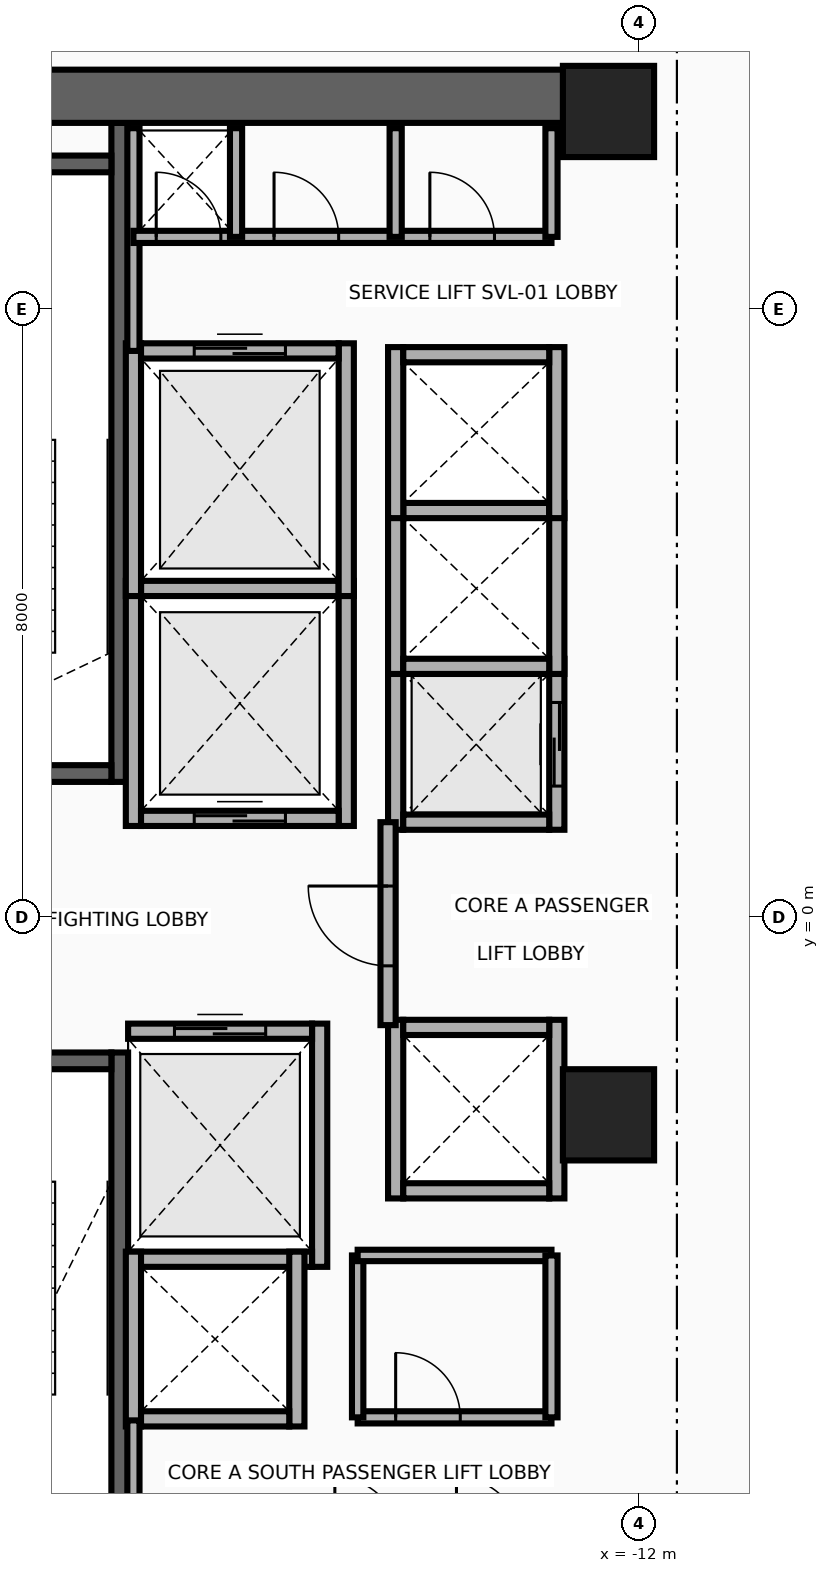
"""IFC4 building model, lengths in metres.
Left out: names, types, materials, properties, quantities, classifications, styles, units other than length and angle.
Written with IfcOpenShell. Run it as: python <this file> out.ifc"""

import sys

from ifc_helpers import new_model, si_unit, direction, frame, frame_2d, origin, origin_2d, place, context, subcontext, project, spatial, rectangle, extrude, source, transform, mapped, element, fill, save


model = new_model("IFC4")
c1 = context("Model", 3, precision=1e-05, world=origin(), true_north=direction((0.0, 1.0)))
c2 = subcontext(c1, "Body", "Model", "MODEL_VIEW")
j1 = project(units=[si_unit("LENGTHUNIT", "METRE"), si_unit("PLANEANGLEUNIT", "RADIAN")], contexts=[c1])
p1 = place(None, origin())
s1 = spatial("IfcSite", under=j1, at=p1, CompositionType="ELEMENT")
p2 = place(p1, origin())
s2 = spatial("IfcBuilding", under=s1, at=p2, CompositionType="ELEMENT")
p3 = place(p2, frame((0.0, 0.0, 116.8)))
s3 = spatial("IfcBuildingStorey", under=s2, at=p3, CompositionType="ELEMENT", Elevation=116.8)
p4 = place(p3, frame((-18.83, 1.78, 0.0), z_axis=(0.0, 0.0, 1.0), x_axis=(0.0, 1.0, 0.0)))
e1 = element("IfcWall", 1, at=p4, inside=s3, PredefinedType="SHEAR", context=c2, shape_type="SweptSolid", body=[
    extrude(rectangle(XDim=8.67, YDim=0.22, at=frame_2d((4.335, 0.0))), origin(), (0.0, 0.0, 1.0), 3.46),
])
p5 = place(p3, frame((-22.05, 1.89, 0.0), z_axis=(0.0, 0.0, 1.0), x_axis=(1.0, 0.0, 0.0)))
e2 = element("IfcWall", 2, at=p5, inside=s3, PredefinedType="SHEAR", context=c2, shape_type="SweptSolid", body=[
    extrude(rectangle(XDim=3.11, YDim=0.22, at=frame_2d((1.555, 0.0))), origin(), (0.0, 0.0, 1.0), 3.46),
])
p6 = place(p5, frame((1.0, 0.0, 0.0)))
e3 = element("IfcOpeningElement", 3, at=p6, cuts=e2, PredefinedType="OPENING", context=c2, shape_type="SweptSolid", body=[
    extrude(rectangle(XDim=1.1, YDim=2.15, at=frame_2d((0.55, 1.075))), frame((0.0, 0.125, 0.0), z_axis=(0.0, -1.0, 0.0), x_axis=(1.0, 0.0, 0.0)), (0.0, 0.0, 1.0), 0.25),
])
p7 = place(p3, frame((-22.05, 9.91, 0.0), z_axis=(0.0, 0.0, 1.0), x_axis=(1.0, 0.0, 0.0)))
e4 = element("IfcWall", 4, at=p7, inside=s3, PredefinedType="SHEAR", context=c2, shape_type="SweptSolid", body=[
    extrude(rectangle(XDim=3.11, YDim=0.22, at=frame_2d((1.555, 0.0))), origin(), (0.0, 0.0, 1.0), 3.46),
])
p8 = place(p3, frame((-18.83, -10.45, 0.0), z_axis=(0.0, 0.0, 1.0), x_axis=(0.0, 1.0, 0.0)))
e5 = element("IfcWall", 5, at=p8, inside=s3, PredefinedType="SHEAR", context=c2, shape_type="SweptSolid", body=[
    extrude(rectangle(XDim=8.67, YDim=0.22, at=frame_2d((4.335, 0.0))), origin(), (0.0, 0.0, 1.0), 3.46),
])
p9 = place(p3, frame((-22.05, -1.89, 0.0), z_axis=(0.0, 0.0, 1.0), x_axis=(1.0, 0.0, 0.0)))
e6 = element("IfcWall", 6, at=p9, inside=s3, PredefinedType="SHEAR", context=c2, shape_type="SweptSolid", body=[
    extrude(rectangle(XDim=3.11, YDim=0.22, at=frame_2d((1.555, 0.0))), origin(), (0.0, 0.0, 1.0), 3.46),
])
p10 = place(p9, frame((1.0, 0.0, 0.0)))
e7 = element("IfcOpeningElement", 7, at=p10, cuts=e6, PredefinedType="OPENING", context=c2, shape_type="SweptSolid", body=[
    extrude(rectangle(XDim=1.1, YDim=2.15, at=frame_2d((0.55, 1.075))), frame((0.0, 0.125, 0.0), z_axis=(0.0, -1.0, 0.0), x_axis=(1.0, 0.0, 0.0)), (0.0, 0.0, 1.0), 0.25),
])
p11 = place(p3, frame((-22.65, 10.8, 0.0), z_axis=(0.0, 0.0, 1.0), x_axis=(1.0, 0.0, 0.0)))
e8 = element("IfcWall", 8, at=p11, inside=s3, PredefinedType="SHEAR", context=c2, shape_type="SweptSolid", body=[
    extrude(rectangle(XDim=10.25, YDim=0.7, at=frame_2d((5.125, 0.0))), origin(), (0.0, 0.0, 1.0), 3.46),
])
m1 = source(origin(), c2, "Body", "SweptSolid", [
    extrude(rectangle(XDim=1.2, YDim=1.2, at=origin_2d()), origin(), (0.0, 0.0, 1.0), 3.7),
])
for number, where, z_axis, x_axis in (
    (9, (-12.4, -2.6, 0.0), (0.0, 0.0, 1.0), (1.0, 0.0, 0.0)),
    (10, (-12.4, 10.6, 0.0), (0.0, 0.0, 1.0), (1.0, 0.0, 0.0)),
):
    element("IfcColumn", number, at=place(p3, frame(where, z_axis=z_axis, x_axis=x_axis)), inside=s3, PredefinedType="COLUMN", context=c2, shape_type="MappedRepresentation", body=[
        mapped(m1, transform((0.0, 0.0, 0.0), x_axis=(1.0, 0.0, 0.0), y_axis=(0.0, 1.0, 0.0), z_axis=(0.0, 0.0, 1.0), scale=1.0)),
    ])
for number, where, z_axis, x_axis in (
    (11, (-18.65, 1.2, 0.0), (0.0, 0.0, 1.0), (0.0, 1.0, 0.0)),
    (12, (-15.85, 1.2, 0.0), (0.0, 0.0, 1.0), (0.0, 1.0, 0.0)),
):
    element("IfcWall", number, at=place(p3, frame(where, z_axis=z_axis, x_axis=x_axis)), inside=s3, PredefinedType="MOVABLE", context=c2, shape_type="SweptSolid", body=[
        extrude(rectangle(XDim=3.225, YDim=0.2, at=frame_2d((1.613, 0.0))), origin(), (0.0, 0.0, 1.0), 3.46),
    ])
p12 = place(p3, frame((-18.55, 1.3, 0.0), z_axis=(0.0, 0.0, 1.0), x_axis=(1.0, 0.0, 0.0)))
e13 = element("IfcWall", 13, at=p12, inside=s3, PredefinedType="MOVABLE", context=c2, shape_type="SweptSolid", body=[
    extrude(rectangle(XDim=2.6, YDim=0.2, at=frame_2d((1.3, 0.0))), origin(), (0.0, 0.0, 1.0), 3.46),
])
p13 = place(p12, frame((0.7, 0.0, 0.0)))
e14 = element("IfcOpeningElement", 14, at=p13, cuts=e13, PredefinedType="OPENING", context=c2, shape_type="SweptSolid", body=[
    extrude(rectangle(XDim=1.2, YDim=2.1, at=frame_2d((0.6, 1.05))), frame((0.0, 0.115, 0.0), z_axis=(0.0, -1.0, 0.0), x_axis=(1.0, 0.0, 0.0)), (0.0, 0.0, 1.0), 0.23),
])
p14 = place(p3, frame((-18.55, 4.325, 0.0), z_axis=(0.0, 0.0, 1.0), x_axis=(1.0, 0.0, 0.0)))
e15 = element("IfcWall", 15, at=p14, inside=s3, PredefinedType="MOVABLE", context=c2, shape_type="SweptSolid", body=[
    extrude(rectangle(XDim=2.6, YDim=0.2, at=frame_2d((1.3, 0.0))), origin(), (0.0, 0.0, 1.0), 3.46),
])
p15 = place(p3, frame((-16.2, -4.6, 0.0), z_axis=(0.0, 0.0, 1.0), x_axis=(0.0, 1.0, 0.0)))
e16 = element("IfcWall", 16, at=p15, inside=s3, PredefinedType="MOVABLE", context=c2, shape_type="SweptSolid", body=[
    extrude(rectangle(XDim=3.2, YDim=0.2, at=frame_2d((1.6, 0.0))), origin(), (0.0, 0.0, 1.0), 3.46),
])
p16 = place(p3, frame((-18.72, -4.5, 0.0), z_axis=(0.0, 0.0, 1.0), x_axis=(1.0, 0.0, 0.0)))
e17 = element("IfcWall", 17, at=p16, inside=s3, PredefinedType="MOVABLE", context=c2, shape_type="SweptSolid", body=[
    extrude(rectangle(XDim=2.42, YDim=0.2, at=frame_2d((1.21, 0.0))), origin(), (0.0, 0.0, 1.0), 3.46),
])
p17 = place(p3, frame((-18.72, -1.5, 0.0), z_axis=(0.0, 0.0, 1.0), x_axis=(1.0, 0.0, 0.0)))
e18 = element("IfcWall", 18, at=p17, inside=s3, PredefinedType="MOVABLE", context=c2, shape_type="SweptSolid", body=[
    extrude(rectangle(XDim=2.42, YDim=0.2, at=frame_2d((1.21, 0.0))), origin(), (0.0, 0.0, 1.0), 3.46),
])
p18 = place(p17, frame((0.61, 0.0, 0.0)))
e19 = element("IfcOpeningElement", 19, at=p18, cuts=e18, PredefinedType="OPENING", context=c2, shape_type="SweptSolid", body=[
    extrude(rectangle(XDim=1.2, YDim=2.1, at=frame_2d((0.6, 1.05))), frame((0.0, 0.115, 0.0), z_axis=(0.0, -1.0, 0.0), x_axis=(1.0, 0.0, 0.0)), (0.0, 0.0, 1.0), 0.23),
])
for number, where, z_axis, x_axis in (
    (20, (-18.65, 4.225, 0.0), (0.0, 0.0, 1.0), (0.0, 1.0, 0.0)),
    (21, (-15.85, 4.225, 0.0), (0.0, 0.0, 1.0), (0.0, 1.0, 0.0)),
):
    element("IfcWall", number, at=place(p3, frame(where, z_axis=z_axis, x_axis=x_axis)), inside=s3, PredefinedType="MOVABLE", context=c2, shape_type="SweptSolid", body=[
        extrude(rectangle(XDim=3.325, YDim=0.2, at=frame_2d((1.663, 0.0))), origin(), (0.0, 0.0, 1.0), 3.46),
    ])
p19 = place(p3, frame((-18.55, 7.45, 0.0), z_axis=(0.0, 0.0, 1.0), x_axis=(1.0, 0.0, 0.0)))
e22 = element("IfcWall", 22, at=p19, inside=s3, PredefinedType="MOVABLE", context=c2, shape_type="SweptSolid", body=[
    extrude(rectangle(XDim=2.6, YDim=0.2, at=frame_2d((1.3, 0.0))), origin(), (0.0, 0.0, 1.0), 3.46),
])
p20 = place(p19, frame((0.7, 0.0, 0.0)))
e23 = element("IfcOpeningElement", 23, at=p20, cuts=e22, PredefinedType="OPENING", context=c2, shape_type="SweptSolid", body=[
    extrude(rectangle(XDim=1.2, YDim=2.1, at=frame_2d((0.6, 1.05))), frame((0.0, 0.115, 0.0), z_axis=(0.0, -1.0, 0.0), x_axis=(1.0, 0.0, 0.0)), (0.0, 0.0, 1.0), 0.23),
])
p21 = place(p3, frame((-15.2, 1.15, 0.0), z_axis=(0.0, 0.0, 1.0), x_axis=(0.0, 1.0, 0.0)))
e24 = element("IfcWall", 24, at=p21, inside=s3, PredefinedType="MOVABLE", context=c2, shape_type="SweptSolid", body=[
    extrude(rectangle(XDim=2.25, YDim=0.2, at=frame_2d((1.125, 0.0))), origin(), (0.0, 0.0, 1.0), 3.46),
])
p22 = place(p3, frame((-13.08, 1.15, 0.0), z_axis=(0.0, 0.0, 1.0), x_axis=(0.0, 1.0, 0.0)))
e25 = element("IfcWall", 25, at=p22, inside=s3, PredefinedType="MOVABLE", context=c2, shape_type="SweptSolid", body=[
    extrude(rectangle(XDim=2.25, YDim=0.2, at=frame_2d((1.125, 0.0))), origin(), (0.0, 0.0, 1.0), 3.46),
])
p23 = place(p22, frame((0.575, 0.0, 0.0)))
e26 = element("IfcOpeningElement", 26, at=p23, cuts=e25, PredefinedType="OPENING", context=c2, shape_type="SweptSolid", body=[
    extrude(rectangle(XDim=1.1, YDim=2.1, at=frame_2d((0.55, 1.05))), frame((0.0, 0.115, 0.0), z_axis=(0.0, -1.0, 0.0), x_axis=(1.0, 0.0, 0.0)), (0.0, 0.0, 1.0), 0.23),
])
p24 = place(p3, frame((-15.1, 1.25, 0.0), z_axis=(0.0, 0.0, 1.0), x_axis=(1.0, 0.0, 0.0)))
e27 = element("IfcWall", 27, at=p24, inside=s3, PredefinedType="MOVABLE", context=c2, shape_type="SweptSolid", body=[
    extrude(rectangle(XDim=1.92, YDim=0.2, at=frame_2d((0.96, 0.0))), origin(), (0.0, 0.0, 1.0), 3.46),
])
for number, where, z_axis, x_axis in (
    (28, (-15.2, 3.2, 0.0), (0.0, 0.0, 1.0), (0.0, 1.0, 0.0)),
    (29, (-13.08, 3.2, 0.0), (0.0, 0.0, 1.0), (0.0, 1.0, 0.0)),
):
    element("IfcWall", number, at=place(p3, frame(where, z_axis=z_axis, x_axis=x_axis)), inside=s3, PredefinedType="MOVABLE", context=c2, shape_type="SweptSolid", body=[
        extrude(rectangle(XDim=2.25, YDim=0.2, at=frame_2d((1.125, 0.0))), origin(), (0.0, 0.0, 1.0), 3.46),
    ])
for number, where, z_axis, x_axis in (
    (30, (-15.1, 3.3, 0.0), (0.0, 0.0, 1.0), (1.0, 0.0, 0.0)),
    (31, (-15.1, 5.35, 0.0), (0.0, 0.0, 1.0), (1.0, 0.0, 0.0)),
):
    element("IfcWall", number, at=place(p3, frame(where, z_axis=z_axis, x_axis=x_axis)), inside=s3, PredefinedType="MOVABLE", context=c2, shape_type="SweptSolid", body=[
        extrude(rectangle(XDim=1.92, YDim=0.2, at=frame_2d((0.96, 0.0))), origin(), (0.0, 0.0, 1.0), 3.46),
    ])
for number, where, z_axis, x_axis in (
    (32, (-15.2, 5.25, 0.0), (0.0, 0.0, 1.0), (0.0, 1.0, 0.0)),
    (33, (-13.08, 5.25, 0.0), (0.0, 0.0, 1.0), (0.0, 1.0, 0.0)),
):
    element("IfcWall", number, at=place(p3, frame(where, z_axis=z_axis, x_axis=x_axis)), inside=s3, PredefinedType="MOVABLE", context=c2, shape_type="SweptSolid", body=[
        extrude(rectangle(XDim=2.25, YDim=0.2, at=frame_2d((1.125, 0.0))), origin(), (0.0, 0.0, 1.0), 3.46),
    ])
p25 = place(p3, frame((-15.1, 7.4, 0.0), z_axis=(0.0, 0.0, 1.0), x_axis=(1.0, 0.0, 0.0)))
e34 = element("IfcWall", 34, at=p25, inside=s3, PredefinedType="MOVABLE", context=c2, shape_type="SweptSolid", body=[
    extrude(rectangle(XDim=1.92, YDim=0.2, at=frame_2d((0.96, 0.0))), origin(), (0.0, 0.0, 1.0), 3.46),
])
for number, where, z_axis, x_axis in (
    (35, (-18.65, -6.7, 0.0), (0.0, 0.0, 1.0), (0.0, 1.0, 0.0)),
    (36, (-16.5, -6.7, 0.0), (0.0, 0.0, 1.0), (0.0, 1.0, 0.0)),
):
    element("IfcWall", number, at=place(p3, frame(where, z_axis=z_axis, x_axis=x_axis)), inside=s3, PredefinedType="MOVABLE", context=c2, shape_type="SweptSolid", body=[
        extrude(rectangle(XDim=2.3, YDim=0.2, at=frame_2d((1.15, 0.0))), origin(), (0.0, 0.0, 1.0), 3.46),
    ])
p26 = place(p3, frame((-18.55, -6.6, 0.0), z_axis=(0.0, 0.0, 1.0), x_axis=(1.0, 0.0, 0.0)))
e37 = element("IfcWall", 37, at=p26, inside=s3, PredefinedType="MOVABLE", context=c2, shape_type="SweptSolid", body=[
    extrude(rectangle(XDim=1.95, YDim=0.2, at=frame_2d((0.975, 0.0))), origin(), (0.0, 0.0, 1.0), 3.46),
])
for number, where, z_axis, x_axis in (
    (38, (-15.2, -3.7, 0.0), (0.0, 0.0, 1.0), (0.0, 1.0, 0.0)),
    (39, (-13.08, -3.7, 0.0), (0.0, 0.0, 1.0), (0.0, 1.0, 0.0)),
):
    element("IfcWall", number, at=place(p3, frame(where, z_axis=z_axis, x_axis=x_axis)), inside=s3, PredefinedType="MOVABLE", context=c2, shape_type="SweptSolid", body=[
        extrude(rectangle(XDim=2.35, YDim=0.2, at=frame_2d((1.175, 0.0))), origin(), (0.0, 0.0, 1.0), 3.46),
    ])
for number, where, z_axis, x_axis in (
    (40, (-15.1, -3.6, 0.0), (0.0, 0.0, 1.0), (1.0, 0.0, 0.0)),
    (41, (-15.1, -1.45, 0.0), (0.0, 0.0, 1.0), (1.0, 0.0, 0.0)),
):
    element("IfcWall", number, at=place(p3, frame(where, z_axis=z_axis, x_axis=x_axis)), inside=s3, PredefinedType="MOVABLE", context=c2, shape_type="SweptSolid", body=[
        extrude(rectangle(XDim=1.92, YDim=0.2, at=frame_2d((0.96, 0.0))), origin(), (0.0, 0.0, 1.0), 3.46),
    ])
p27 = place(p3, frame((-15.3, -1.42, 0.0), z_axis=(0.0, 0.0, 1.0), x_axis=(0.0, 1.0, 0.0)))
e42 = element("IfcWall", 42, at=p27, inside=s3, PredefinedType="PARTITIONING", context=c2, shape_type="SweptSolid", body=[
    extrude(rectangle(XDim=2.67, YDim=0.2, at=frame_2d((1.335, 0.0))), origin(), (0.0, 0.0, 1.0), 3.46),
])
p28 = place(p27, frame((0.78, 0.0, 0.0)))
e43 = element("IfcOpeningElement", 43, at=p28, cuts=e42, PredefinedType="OPENING", context=c2, shape_type="SweptSolid", body=[
    extrude(rectangle(XDim=1.05, YDim=2.15, at=frame_2d((0.525, 1.075))), frame((0.0, 0.115, 0.0), z_axis=(0.0, -1.0, 0.0), x_axis=(1.0, 0.0, 0.0)), (0.0, 0.0, 1.0), 0.23),
])
p29 = place(p3, frame((-18.65, 7.45, 0.0), z_axis=(0.0, 0.0, 1.0), x_axis=(0.0, 1.0, 0.0)))
e44 = element("IfcWall", 44, at=p29, inside=s3, PredefinedType="PARTITIONING", context=c2, shape_type="SweptSolid", body=[
    extrude(rectangle(XDim=2.93, YDim=0.16, at=frame_2d((1.465, 0.0))), origin(), (0.0, 0.0, 1.0), 3.46),
])
p30 = place(p3, frame((-18.65, -8.18, 0.0), z_axis=(0.0, 0.0, 1.0), x_axis=(0.0, 1.0, 0.0)))
e45 = element("IfcWall", 45, at=p30, inside=s3, PredefinedType="PARTITIONING", context=c2, shape_type="SweptSolid", body=[
    extrude(rectangle(XDim=1.56, YDim=0.16, at=frame_2d((0.78, 0.0))), origin(), (0.0, 0.0, 1.0), 3.46),
])
p31 = place(p3, frame((-18.65, 8.95, 0.0), z_axis=(0.0, 0.0, 1.0), x_axis=(1.0, 0.0, 0.0)))
e46 = element("IfcWall", 46, at=p31, inside=s3, PredefinedType="PARTITIONING", context=c2, shape_type="SweptSolid", body=[
    extrude(rectangle(XDim=5.5, YDim=0.16, at=frame_2d((2.75, 0.0))), origin(), (0.0, 0.0, 1.0), 3.46),
])
p32 = place(p31, frame((0.3, 0.0, 0.0)))
e47 = element("IfcOpeningElement", 47, at=p32, cuts=e46, PredefinedType="OPENING", context=c2, shape_type="SweptSolid", body=[
    extrude(rectangle(XDim=0.85, YDim=2.05, at=frame_2d((0.425, 1.025))), frame((0.0, 0.095, 0.0), z_axis=(0.0, -1.0, 0.0), x_axis=(1.0, 0.0, 0.0)), (0.0, 0.0, 1.0), 0.19),
])
p33 = place(p31, frame((1.85, 0.0, 0.0)))
e48 = element("IfcOpeningElement", 48, at=p33, cuts=e46, PredefinedType="OPENING", context=c2, shape_type="SweptSolid", body=[
    extrude(rectangle(XDim=0.85, YDim=2.05, at=frame_2d((0.425, 1.025))), frame((0.0, 0.095, 0.0), z_axis=(0.0, -1.0, 0.0), x_axis=(1.0, 0.0, 0.0)), (0.0, 0.0, 1.0), 0.19),
])
p34 = place(p31, frame((3.9, 0.0, 0.0)))
e49 = element("IfcOpeningElement", 49, at=p34, cuts=e46, PredefinedType="OPENING", context=c2, shape_type="SweptSolid", body=[
    extrude(rectangle(XDim=0.85, YDim=2.05, at=frame_2d((0.425, 1.025))), frame((0.0, 0.095, 0.0), z_axis=(0.0, -1.0, 0.0), x_axis=(1.0, 0.0, 0.0)), (0.0, 0.0, 1.0), 0.19),
])
for number, where, z_axis, x_axis in (
    (50, (-13.15, 8.95, 0.0), (0.0, 0.0, 1.0), (0.0, 1.0, 0.0)),
    (51, (-17.3, 8.95, 0.0), (0.0, 0.0, 1.0), (0.0, 1.0, 0.0)),
    (52, (-15.2, 8.95, 0.0), (0.0, 0.0, 1.0), (0.0, 1.0, 0.0)),
):
    element("IfcWall", number, at=place(p3, frame(where, z_axis=z_axis, x_axis=x_axis)), inside=s3, PredefinedType="PARTITIONING", context=c2, shape_type="SweptSolid", body=[
        extrude(rectangle(XDim=1.43, YDim=0.16, at=frame_2d((0.715, 0.0))), origin(), (0.0, 0.0, 1.0), 3.46),
    ])
p35 = place(p3, frame((-15.7, -6.58, 0.0), z_axis=(0.0, 0.0, 1.0), x_axis=(1.0, 0.0, 0.0)))
e53 = element("IfcWall", 53, at=p35, inside=s3, PredefinedType="PARTITIONING", context=c2, shape_type="SweptSolid", body=[
    extrude(rectangle(XDim=2.55, YDim=0.16, at=frame_2d((1.275, 0.0))), origin(), (0.0, 0.0, 1.0), 3.46),
])
p36 = place(p35, frame((0.5, 0.0, 0.0)))
e54 = element("IfcOpeningElement", 54, at=p36, cuts=e53, PredefinedType="OPENING", context=c2, shape_type="SweptSolid", body=[
    extrude(rectangle(XDim=0.85, YDim=2.05, at=frame_2d((0.425, 1.025))), frame((0.0, 0.095, 0.0), z_axis=(0.0, -1.0, 0.0), x_axis=(1.0, 0.0, 0.0)), (0.0, 0.0, 1.0), 0.19),
])
p37 = place(p3, frame((-15.7, -6.58, 0.0), z_axis=(0.0, 0.0, 1.0), x_axis=(0.0, 1.0, 0.0)))
e55 = element("IfcWall", 55, at=p37, inside=s3, PredefinedType="PARTITIONING", context=c2, shape_type="SweptSolid", body=[
    extrude(rectangle(XDim=2.13, YDim=0.15, at=frame_2d((1.065, 0.0))), origin(), (0.0, 0.0, 1.0), 3.46),
])
p38 = place(p3, frame((-15.7, -4.45, 0.0), z_axis=(0.0, 0.0, 1.0), x_axis=(1.0, 0.0, 0.0)))
e56 = element("IfcWall", 56, at=p38, inside=s3, PredefinedType="PARTITIONING", context=c2, shape_type="SweptSolid", body=[
    extrude(rectangle(XDim=2.55, YDim=0.15, at=frame_2d((1.275, 0.0))), origin(), (0.0, 0.0, 1.0), 3.46),
])
p39 = place(p3, frame((-13.15, -6.58, 0.0), z_axis=(0.0, 0.0, 1.0), x_axis=(0.0, 1.0, 0.0)))
e57 = element("IfcWall", 57, at=p39, inside=s3, PredefinedType="PARTITIONING", context=c2, shape_type="SweptSolid", body=[
    extrude(rectangle(XDim=2.13, YDim=0.16, at=frame_2d((1.065, 0.0))), origin(), (0.0, 0.0, 1.0), 3.46),
])
p40 = place(p13, origin())
e58 = element("IfcDoor", 58, at=p40, inside=s3, OperationType="DOUBLE_DOOR_SLIDING", PredefinedType="DOOR", context=c2, shape_type="SweptSolid", body=[
    extrude(rectangle(XDim=1.2, YDim=2.1, at=frame_2d((0.6, 1.05))), frame((0.0, 0.025, 0.0), z_axis=(0.0, -1.0, 0.0), x_axis=(1.0, 0.0, 0.0)), (0.0, 0.0, 1.0), 0.05),
])
fill(e14, e58)
p41 = place(p18, origin())
e59 = element("IfcDoor", 59, at=p41, inside=s3, OperationType="DOUBLE_DOOR_SLIDING", PredefinedType="DOOR", context=c2, shape_type="SweptSolid", body=[
    extrude(rectangle(XDim=1.2, YDim=2.1, at=frame_2d((0.6, 1.05))), frame((0.0, 0.025, 0.0), z_axis=(0.0, -1.0, 0.0), x_axis=(1.0, 0.0, 0.0)), (0.0, 0.0, 1.0), 0.05),
])
fill(e19, e59)
p42 = place(p20, origin())
e60 = element("IfcDoor", 60, at=p42, inside=s3, OperationType="DOUBLE_DOOR_SLIDING", PredefinedType="DOOR", context=c2, shape_type="SweptSolid", body=[
    extrude(rectangle(XDim=1.2, YDim=2.1, at=frame_2d((0.6, 1.05))), frame((0.0, 0.025, 0.0), z_axis=(0.0, -1.0, 0.0), x_axis=(1.0, 0.0, 0.0)), (0.0, 0.0, 1.0), 0.05),
])
fill(e23, e60)
p43 = place(p23, origin())
e61 = element("IfcDoor", 61, at=p43, inside=s3, OperationType="DOUBLE_DOOR_SLIDING", PredefinedType="DOOR", context=c2, shape_type="SweptSolid", body=[
    extrude(rectangle(XDim=1.1, YDim=2.1, at=frame_2d((0.55, 1.05))), frame((0.0, 0.025, 0.0), z_axis=(0.0, -1.0, 0.0), x_axis=(1.0, 0.0, 0.0)), (0.0, 0.0, 1.0), 0.05),
])
fill(e26, e61)
p44 = place(p28, origin())
e62 = element("IfcDoor", 62, at=p44, inside=s3, OperationType="SINGLE_SWING_RIGHT", PredefinedType="DOOR", context=c2, shape_type="SweptSolid", body=[
    extrude(rectangle(XDim=1.05, YDim=2.15, at=frame_2d((0.525, 1.075))), frame((0.0, 0.025, 0.0), z_axis=(0.0, -1.0, 0.0), x_axis=(1.0, 0.0, 0.0)), (0.0, 0.0, 1.0), 0.05),
])
fill(e43, e62)
p45 = place(p32, origin())
e63 = element("IfcDoor", 63, at=p45, inside=s3, OperationType="SINGLE_SWING_LEFT", PredefinedType="DOOR", context=c2, shape_type="SweptSolid", body=[
    extrude(rectangle(XDim=0.85, YDim=2.05, at=frame_2d((0.425, 1.025))), frame((0.0, 0.025, 0.0), z_axis=(0.0, -1.0, 0.0), x_axis=(1.0, 0.0, 0.0)), (0.0, 0.0, 1.0), 0.05),
])
fill(e47, e63)
p46 = place(p33, origin())
e64 = element("IfcDoor", 64, at=p46, inside=s3, OperationType="SINGLE_SWING_RIGHT", PredefinedType="DOOR", context=c2, shape_type="SweptSolid", body=[
    extrude(rectangle(XDim=0.85, YDim=2.05, at=frame_2d((0.425, 1.025))), frame((0.0, 0.025, 0.0), z_axis=(0.0, -1.0, 0.0), x_axis=(1.0, 0.0, 0.0)), (0.0, 0.0, 1.0), 0.05),
])
fill(e48, e64)
p47 = place(p34, origin())
e65 = element("IfcDoor", 65, at=p47, inside=s3, OperationType="SINGLE_SWING_LEFT", PredefinedType="DOOR", context=c2, shape_type="SweptSolid", body=[
    extrude(rectangle(XDim=0.85, YDim=2.05, at=frame_2d((0.425, 1.025))), frame((0.0, 0.025, 0.0), z_axis=(0.0, -1.0, 0.0), x_axis=(1.0, 0.0, 0.0)), (0.0, 0.0, 1.0), 0.05),
])
fill(e49, e65)
p48 = place(p36, origin())
e66 = element("IfcDoor", 66, at=p48, inside=s3, OperationType="SINGLE_SWING_RIGHT", PredefinedType="DOOR", context=c2, shape_type="SweptSolid", body=[
    extrude(rectangle(XDim=0.85, YDim=2.05, at=frame_2d((0.425, 1.025))), frame((0.0, 0.025, 0.0), z_axis=(0.0, -1.0, 0.0), x_axis=(1.0, 0.0, 0.0)), (0.0, 0.0, 1.0), 0.05),
])
fill(e54, e66)
save(model, sys.argv[1])
